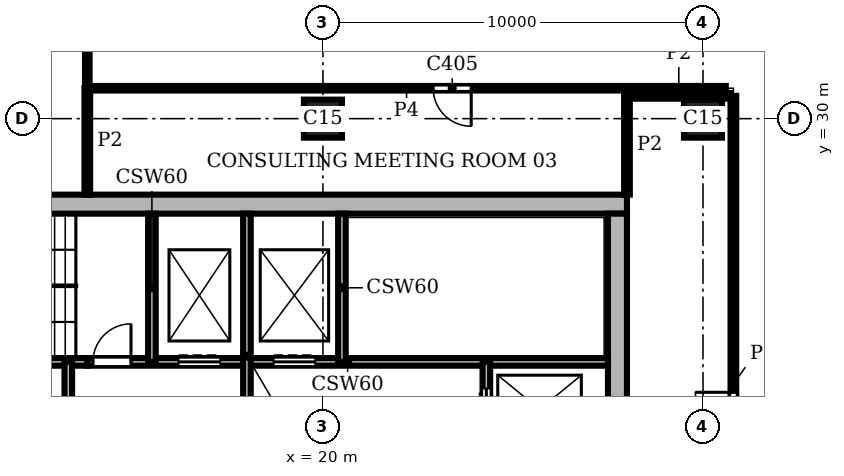
"""IFC4 building model, lengths in metres.
Left out: names, types, materials, properties, quantities, classifications, styles, units other than length and angle.
Written with IfcOpenShell. Run it as: python <this file> out.ifc"""

import sys

from ifc_helpers import new_model, si_unit, direction, frame, frame_2d, origin, origin_2d, place, context, subcontext, project, spatial, rectangle, extrude, element, fill, save


model = new_model("IFC4")
c1 = context("Model", 3, precision=1e-05, world=origin(), true_north=direction((0.0, 1.0)))
c2 = subcontext(c1, "Body", "Model", "MODEL_VIEW")
j1 = project(units=[si_unit("LENGTHUNIT", "METRE"), si_unit("PLANEANGLEUNIT", "RADIAN")], contexts=[c1])
p1 = place(None, origin())
s1 = spatial("IfcSite", under=j1, at=p1, CompositionType="ELEMENT")
p2 = place(p1, origin())
s2 = spatial("IfcBuilding", under=s1, at=p2, CompositionType="ELEMENT")
p3 = place(p2, frame((0.0, 0.0, 278.7)))
s3 = spatial("IfcBuildingStorey", under=s2, at=p3, CompositionType="ELEMENT", Elevation=278.7)
for number, where, z_axis, x_axis in (
    (1, (20.0, 30.0, 0.0), (0.0, 0.0, 1.0), (1.0, 0.0, 0.0)),
    (2, (30.0, 30.0, 0.0), (0.0, 0.0, 1.0), (1.0, 0.0, 0.0)),
):
    element("IfcColumn", number, at=place(p3, frame(where, z_axis=z_axis, x_axis=x_axis)), inside=s3, PredefinedType="COLUMN", context=c2, shape_type="SweptSolid", body=[
        extrude(rectangle(XDim=1.0, YDim=1.0, at=origin_2d()), origin(), (0.0, 0.0, 1.0), 3.9),
    ])
p4 = place(p3, frame((27.75, 8.5, 0.0), z_axis=(0.0, 0.0, 1.0), x_axis=(0.0, 1.0, 0.0)))
e3 = element("IfcWall", 3, at=p4, inside=s3, PredefinedType="SHEAR", context=c2, shape_type="SweptSolid", body=[
    extrude(rectangle(XDim=19.0, YDim=0.5, at=frame_2d((9.5, 0.0))), origin(), (0.0, 0.0, 1.0), 3.9),
])
p5 = place(p4, frame((4.95, 0.0, 0.0)))
e4 = element("IfcOpeningElement", 4, at=p5, cuts=e3, PredefinedType="OPENING", context=c2, shape_type="SweptSolid", body=[
    extrude(rectangle(XDim=1.6, YDim=2.1, at=frame_2d((0.8, 1.05))), frame((0.0, 0.26, 0.0), z_axis=(0.0, -1.0, 0.0), x_axis=(1.0, 0.0, 0.0)), (0.0, 0.0, 1.0), 0.52),
])
p6 = place(p3, frame((28.0, 27.75, 0.0), z_axis=(0.0, 0.0, 1.0), x_axis=(-1.0, 0.0, 0.0)))
e5 = element("IfcWall", 5, at=p6, inside=s3, PredefinedType="SHEAR", context=c2, shape_type="SweptSolid", body=[
    extrude(rectangle(XDim=20.0, YDim=0.5, at=frame_2d((10.0, 0.0))), origin(), (0.0, 0.0, 1.0), 3.9),
])
p7 = place(p3, frame((8.5, 23.6, 0.0), z_axis=(0.0, 0.0, 1.0), x_axis=(1.0, 0.0, 0.0)))
e6 = element("IfcWall", 6, at=p7, inside=s3, PredefinedType="SHEAR", context=c2, shape_type="SweptSolid", body=[
    extrude(rectangle(XDim=5.3, YDim=0.2, at=frame_2d((2.65, 0.0))), origin(), (0.0, 0.0, 1.0), 3.58),
])
p8 = place(p3, frame((13.8, 23.6, 0.0), z_axis=(0.0, 0.0, 1.0), x_axis=(1.0, 0.0, 0.0)))
e7 = element("IfcWall", 7, at=p8, inside=s3, PredefinedType="SHEAR", context=c2, shape_type="SweptSolid", body=[
    extrude(rectangle(XDim=13.7, YDim=0.2, at=frame_2d((6.85, 0.0))), origin(), (0.0, 0.0, 1.0), 3.58),
])
p9 = place(p8, frame((2.4, 0.0, 0.0)))
e8 = element("IfcOpeningElement", 8, at=p9, cuts=e7, PredefinedType="OPENING", context=c2, shape_type="SweptSolid", body=[
    extrude(rectangle(XDim=1.1, YDim=2.1, at=frame_2d((0.55, 1.05))), frame((0.0, 0.11, 0.0), z_axis=(0.0, -1.0, 0.0), x_axis=(1.0, 0.0, 0.0)), (0.0, 0.0, 1.0), 0.22),
])
p10 = place(p8, frame((4.9, 0.0, 0.0)))
e9 = element("IfcOpeningElement", 9, at=p10, cuts=e7, PredefinedType="OPENING", context=c2, shape_type="SweptSolid", body=[
    extrude(rectangle(XDim=1.1, YDim=2.1, at=frame_2d((0.55, 1.05))), frame((0.0, 0.11, 0.0), z_axis=(0.0, -1.0, 0.0), x_axis=(1.0, 0.0, 0.0)), (0.0, 0.0, 1.0), 0.22),
])
p11 = place(p8, frame((0.15, 0.0, 0.0)))
e10 = element("IfcOpeningElement", 10, at=p11, cuts=e7, PredefinedType="OPENING", context=c2, shape_type="SweptSolid", body=[
    extrude(rectangle(XDim=1.0, YDim=2.1, at=frame_2d((0.5, 1.05))), frame((0.0, 0.11, 0.0), z_axis=(0.0, -1.0, 0.0), x_axis=(1.0, 0.0, 0.0)), (0.0, 0.0, 1.0), 0.22),
])
p12 = place(p3, frame((13.3, 20.0, 0.0), z_axis=(0.0, 0.0, 1.0), x_axis=(0.0, 1.0, 0.0)))
e11 = element("IfcWall", 11, at=p12, inside=s3, PredefinedType="SHEAR", context=c2, shape_type="SweptSolid", body=[
    extrude(rectangle(XDim=3.6, YDim=0.2, at=frame_2d((1.8, 0.0))), origin(), (0.0, 0.0, 1.0), 3.58),
])
p13 = place(p3, frame((15.5, 23.6, 0.0), z_axis=(0.0, 0.0, 1.0), x_axis=(0.0, 1.0, 0.0)))
e12 = element("IfcWall", 12, at=p13, inside=s3, PredefinedType="SHEAR", context=c2, shape_type="SweptSolid", body=[
    extrude(rectangle(XDim=3.9, YDim=0.2, at=frame_2d((1.95, 0.0))), origin(), (0.0, 0.0, 1.0), 3.58),
])
p14 = place(p3, frame((18.0, 20.0, 0.0), z_axis=(0.0, 0.0, 1.0), x_axis=(0.0, 1.0, 0.0)))
e13 = element("IfcWall", 13, at=p14, inside=s3, PredefinedType="SHEAR", context=c2, shape_type="SweptSolid", body=[
    extrude(rectangle(XDim=7.5, YDim=0.2, at=frame_2d((3.75, 0.0))), origin(), (0.0, 0.0, 1.0), 3.58),
])
p15 = place(p14, frame((1.2, 0.0, 0.0)))
e14 = element("IfcOpeningElement", 14, at=p15, cuts=e13, PredefinedType="OPENING", context=c2, shape_type="SweptSolid", body=[
    extrude(rectangle(XDim=1.2, YDim=2.1, at=frame_2d((0.6, 1.05))), frame((0.0, 0.11, 0.0), z_axis=(0.0, -1.0, 0.0), x_axis=(1.0, 0.0, 0.0)), (0.0, 0.0, 1.0), 0.22),
])
p16 = place(p3, frame((20.5, 23.6, 0.0), z_axis=(0.0, 0.0, 1.0), x_axis=(0.0, 1.0, 0.0)))
e15 = element("IfcWall", 15, at=p16, inside=s3, PredefinedType="SHEAR", context=c2, shape_type="SweptSolid", body=[
    extrude(rectangle(XDim=3.9, YDim=0.2, at=frame_2d((1.95, 0.0))), origin(), (0.0, 0.0, 1.0), 3.58),
])
p17 = place(p3, frame((24.3, 16.1, 0.0), z_axis=(0.0, 0.0, 1.0), x_axis=(0.0, 1.0, 0.0)))
e16 = element("IfcWall", 16, at=p17, inside=s3, PredefinedType="SHEAR", context=c2, shape_type="SweptSolid", body=[
    extrude(rectangle(XDim=7.5, YDim=0.2, at=frame_2d((3.75, 0.0))), origin(), (0.0, 0.0, 1.0), 3.58),
])
p18 = place(p17, frame((5.7, 0.0, 0.0)))
e17 = element("IfcOpeningElement", 17, at=p18, cuts=e16, PredefinedType="OPENING", context=c2, shape_type="SweptSolid", body=[
    extrude(rectangle(XDim=1.1, YDim=2.1, at=frame_2d((0.55, 1.05))), frame((0.0, 0.11, 0.0), z_axis=(0.0, -1.0, 0.0), x_axis=(1.0, 0.0, 0.0)), (0.0, 0.0, 1.0), 0.22),
])
p19 = place(p3, frame((13.8, 28.0, 0.0), z_axis=(0.0, 0.0, 1.0), x_axis=(0.0, 1.0, 0.0)))
e18 = element("IfcWall", 18, at=p19, inside=s3, PredefinedType="PARTITIONING", context=c2, shape_type="SweptSolid", body=[
    extrude(rectangle(XDim=2.801, YDim=0.15, at=frame_2d((1.4, 0.0))), origin(), (0.0, 0.0, 1.0), 3.58),
])
p20 = place(p3, frame((28.0, 28.0, 0.0), z_axis=(0.0, 0.0, 1.0), x_axis=(0.0, 1.0, 0.0)))
e19 = element("IfcWall", 19, at=p20, inside=s3, PredefinedType="PARTITIONING", context=c2, shape_type="SweptSolid", body=[
    extrude(rectangle(XDim=2.598, YDim=0.15, at=frame_2d((1.299, 0.0))), origin(), (0.0, 0.0, 1.0), 3.58),
])
p21 = place(p3, frame((30.8, 15.45, 0.0), z_axis=(0.0, 0.0, 1.0), x_axis=(0.0, 1.0, 0.0)))
e20 = element("IfcWall", 20, at=p21, inside=s3, PredefinedType="PARTITIONING", context=c2, shape_type="SweptSolid", body=[
    extrude(rectangle(XDim=15.15, YDim=0.15, at=frame_2d((7.575, 0.0))), origin(), (0.0, 0.0, 1.0), 3.58),
])
p22 = place(p21, frame((6.35, 0.0, 0.0)))
e21 = element("IfcOpeningElement", 21, at=p22, cuts=e20, PredefinedType="OPENING", context=c2, shape_type="SweptSolid", body=[
    extrude(rectangle(XDim=1.0, YDim=2.1, at=frame_2d((0.5, 1.05))), frame((0.0, 0.085, 0.0), z_axis=(0.0, -1.0, 0.0), x_axis=(1.0, 0.0, 0.0)), (0.0, 0.0, 1.0), 0.17),
])
p23 = place(p3, frame((28.002, 30.6, 0.0), z_axis=(0.0, 0.0, 1.0), x_axis=(1.0, 0.0, 0.0)))
e22 = element("IfcWall", 22, at=p23, inside=s3, PredefinedType="PARTITIONING", context=c2, shape_type="SweptSolid", body=[
    extrude(rectangle(XDim=2.723, YDim=0.15, at=frame_2d((1.362, 0.0))), origin(), (0.0, 0.0, 1.0), 3.58),
])
p24 = place(p3, frame((13.8, 30.8, 0.0), z_axis=(0.0, 0.0, 1.0), x_axis=(0.0, 1.0, 0.0)))
e23 = element("IfcWall", 23, at=p24, inside=s3, PredefinedType="PARTITIONING", context=c2, shape_type="SweptSolid", body=[
    extrude(rectangle(XDim=26.8, YDim=0.12, at=frame_2d((13.4, 0.0))), origin(), (0.0, 0.0, 1.0), 3.58),
])
p25 = place(p24, frame((9.1, 0.0, 0.0)))
e24 = element("IfcOpeningElement", 24, at=p25, cuts=e23, PredefinedType="OPENING", context=c2, shape_type="SweptSolid", body=[
    extrude(rectangle(XDim=1.8, YDim=2.1, at=frame_2d((0.9, 1.05))), frame((0.0, 0.07, 0.0), z_axis=(0.0, -1.0, 0.0), x_axis=(1.0, 0.0, 0.0)), (0.0, 0.0, 1.0), 0.14),
])
p26 = place(p3, frame((13.802, 30.8, 0.0), z_axis=(0.0, 0.0, 1.0), x_axis=(1.0, 0.0, 0.0)))
e25 = element("IfcWall", 25, at=p26, inside=s3, PredefinedType="PARTITIONING", context=c2, shape_type="SweptSolid", body=[
    extrude(rectangle(XDim=16.798, YDim=0.12, at=frame_2d((8.399, 0.0))), origin(), (0.0, 0.0, 1.0), 3.58),
])
p27 = place(p26, frame((9.1, 0.0, 0.0)))
e26 = element("IfcOpeningElement", 26, at=p27, cuts=e25, PredefinedType="OPENING", context=c2, shape_type="SweptSolid", body=[
    extrude(rectangle(XDim=1.0, YDim=2.1, at=frame_2d((0.5, 1.05))), frame((0.0, 0.07, 0.0), z_axis=(0.0, -1.0, 0.0), x_axis=(1.0, 0.0, 0.0)), (0.0, 0.0, 1.0), 0.14),
])
p28 = place(p18, origin())
e27 = element("IfcDoor", 27, at=p28, inside=s3, OperationType="DOUBLE_DOOR_SLIDING", PredefinedType="DOOR", context=c2, shape_type="SweptSolid", body=[
    extrude(rectangle(XDim=1.1, YDim=2.1, at=frame_2d((0.55, 1.05))), frame((0.0, 0.025, 0.0), z_axis=(0.0, -1.0, 0.0), x_axis=(1.0, 0.0, 0.0)), (0.0, 0.0, 1.0), 0.05),
])
fill(e17, e27)
p29 = place(p9, origin())
e28 = element("IfcDoor", 28, at=p29, inside=s3, OperationType="DOUBLE_DOOR_SLIDING", PredefinedType="DOOR", context=c2, shape_type="SweptSolid", body=[
    extrude(rectangle(XDim=1.1, YDim=2.1, at=frame_2d((0.55, 1.05))), frame((0.0, 0.025, 0.0), z_axis=(0.0, -1.0, 0.0), x_axis=(1.0, 0.0, 0.0)), (0.0, 0.0, 1.0), 0.05),
])
fill(e8, e28)
p30 = place(p10, origin())
e29 = element("IfcDoor", 29, at=p30, inside=s3, OperationType="DOUBLE_DOOR_SLIDING", PredefinedType="DOOR", context=c2, shape_type="SweptSolid", body=[
    extrude(rectangle(XDim=1.1, YDim=2.1, at=frame_2d((0.55, 1.05))), frame((0.0, 0.025, 0.0), z_axis=(0.0, -1.0, 0.0), x_axis=(1.0, 0.0, 0.0)), (0.0, 0.0, 1.0), 0.05),
])
fill(e9, e29)
p31 = place(p11, origin())
e30 = element("IfcDoor", 30, at=p31, inside=s3, OperationType="SINGLE_SWING_RIGHT", PredefinedType="DOOR", context=c2, shape_type="SweptSolid", body=[
    extrude(rectangle(XDim=1.0, YDim=2.1, at=frame_2d((0.5, 1.05))), frame((0.0, 0.025, 0.0), z_axis=(0.0, -1.0, 0.0), x_axis=(1.0, 0.0, 0.0)), (0.0, 0.0, 1.0), 0.05),
])
fill(e10, e30)
p32 = place(p27, frame((1.0, 0.0, 0.0), z_axis=(0.0, 0.0, 1.0), x_axis=(-1.0, 0.0, 0.0)))
e31 = element("IfcDoor", 31, at=p32, inside=s3, OperationType="SINGLE_SWING_LEFT", PredefinedType="DOOR", context=c2, shape_type="SweptSolid", body=[
    extrude(rectangle(XDim=1.0, YDim=2.1, at=frame_2d((0.5, 1.05))), frame((0.0, 0.025, 0.0), z_axis=(0.0, -1.0, 0.0), x_axis=(1.0, 0.0, 0.0)), (0.0, 0.0, 1.0), 0.05),
])
fill(e26, e31)
p33 = place(p22, origin())
e32 = element("IfcDoor", 32, at=p33, inside=s3, OperationType="SINGLE_SWING_RIGHT", PredefinedType="DOOR", context=c2, shape_type="SweptSolid", body=[
    extrude(rectangle(XDim=1.0, YDim=2.1, at=frame_2d((0.5, 1.05))), frame((0.0, 0.025, 0.0), z_axis=(0.0, -1.0, 0.0), x_axis=(1.0, 0.0, 0.0)), (0.0, 0.0, 1.0), 0.05),
])
fill(e21, e32)
save(model, sys.argv[1])
